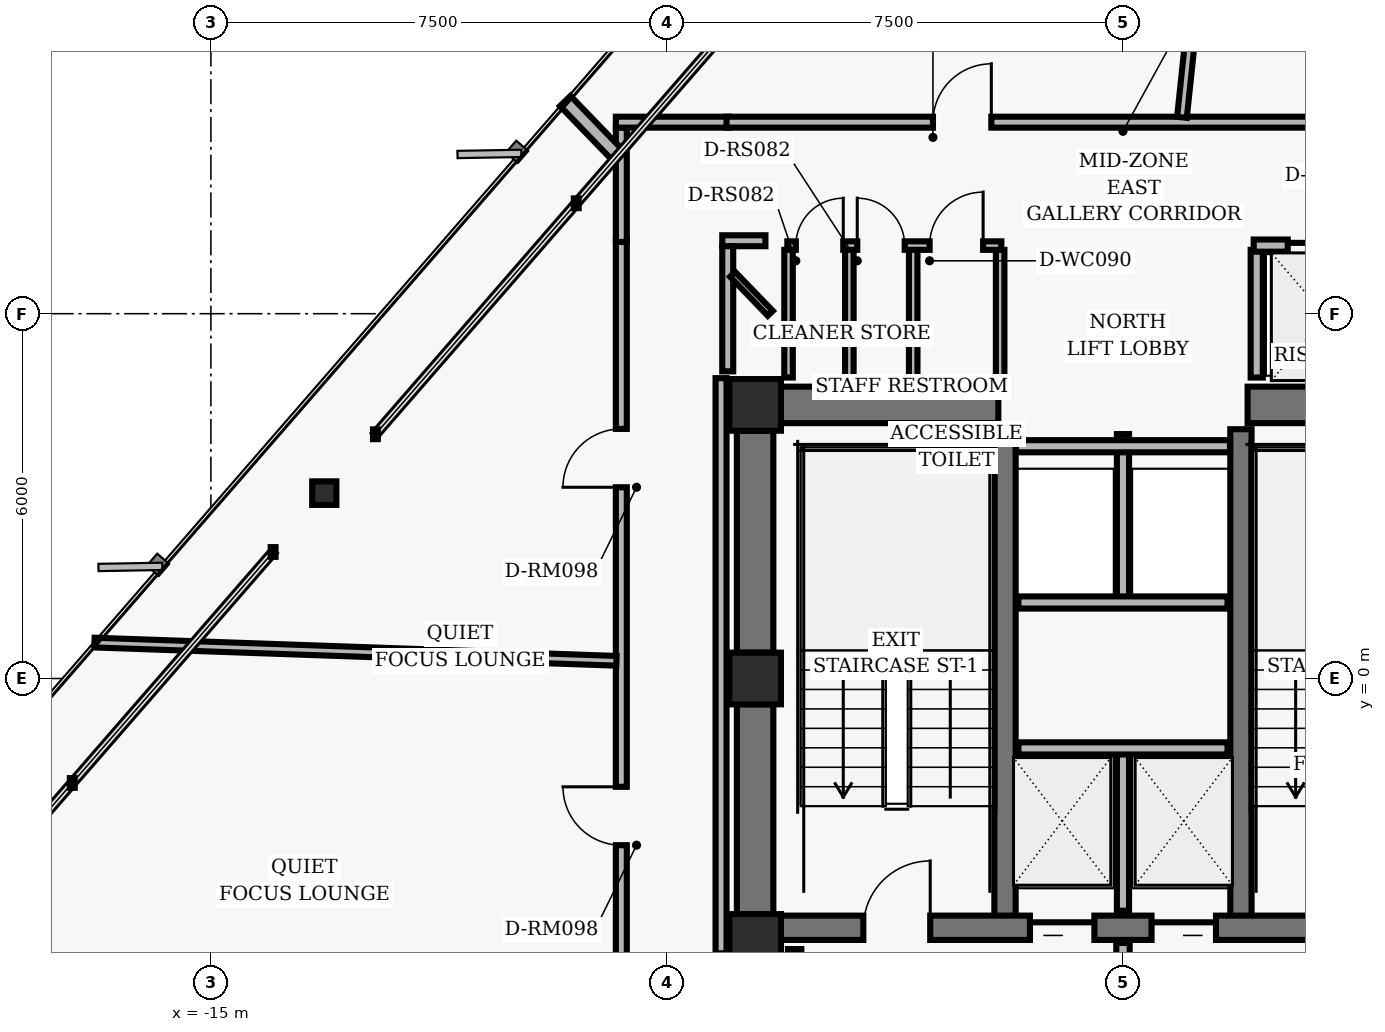
"""IFC4 building model, lengths in metres.
Left out: names, types, materials, properties, quantities, classifications, styles, units other than length and angle.
Written with IfcOpenShell. Run it as: python <this file> out.ifc"""

import sys

from ifc_helpers import new_model, si_unit, direction, frame, frame_2d, origin, origin_2d, place, context, subcontext, project, spatial, rectangle, hollow_rectangle, i_section, extrude, element, fill, save


model = new_model("IFC4")
c1 = context("Model", 3, precision=1e-05, world=origin(), true_north=direction((0.0, 1.0)))
c2 = subcontext(c1, "Body", "Model", "MODEL_VIEW")
j1 = project(units=[si_unit("LENGTHUNIT", "METRE"), si_unit("PLANEANGLEUNIT", "RADIAN")], contexts=[c1])
p1 = place(None, origin())
s1 = spatial("IfcSite", under=j1, at=p1, CompositionType="ELEMENT")
p2 = place(p1, origin())
s2 = spatial("IfcBuilding", under=s1, at=p2, CompositionType="ELEMENT")
p3 = place(p2, frame((0.0, 0.0, 162.4)))
s3 = spatial("IfcBuildingStorey", under=s2, at=p3, CompositionType="ELEMENT", Elevation=162.4)
for number, where, z_axis, x_axis in (
    (1, (-6.05, 4.5, 0.0), (0.0, 0.0, 1.0), (1.0, 0.0, 0.0)),
    (2, (-6.05, 0.0, 0.0), (0.0, 0.0, 1.0), (1.0, 0.0, 0.0)),
    (3, (-6.05, -4.3, 0.0), (0.0, 0.0, 1.0), (1.0, 0.0, 0.0)),
):
    element("IfcColumn", number, at=place(p3, frame(where, z_axis=z_axis, x_axis=x_axis)), inside=s3, PredefinedType="COLUMN", context=c2, shape_type="SweptSolid", body=[
        extrude(hollow_rectangle(XDim=0.85, YDim=0.85, WallThickness=0.055, InnerFilletRadius=0.02, OuterFilletRadius=0.04, at=origin_2d()), origin(), (0.0, 0.0, 1.0), 3.04),
    ])
p4 = place(p3, frame((-6.05, 0.425, 0.0), z_axis=(0.0, 0.0, 1.0), x_axis=(0.0, 1.0, 0.0)))
e4 = element("IfcWall", 4, at=p4, inside=s3, PredefinedType="SHEAR", context=c2, shape_type="SweptSolid", body=[
    extrude(rectangle(XDim=3.65, YDim=0.6, at=frame_2d((1.825, 0.0))), origin(), (0.0, 0.0, 1.0), 2.788),
])
p5 = place(p3, frame((-6.05, -3.875, 0.0), z_axis=(0.0, 0.0, 1.0), x_axis=(0.0, 1.0, 0.0)))
e5 = element("IfcWall", 5, at=p5, inside=s3, PredefinedType="SHEAR", context=c2, shape_type="SweptSolid", body=[
    extrude(rectangle(XDim=3.45, YDim=0.6, at=frame_2d((1.725, 0.0))), origin(), (0.0, 0.0, 1.0), 2.788),
])
for number, where, z_axis, x_axis in (
    (6, (-1.94, -4.1, 0.0), (0.0, 0.0, 1.0), (0.0, 1.0, 0.0)),
    (7, (1.94, -4.1, 0.0), (0.0, 0.0, 1.0), (0.0, 1.0, 0.0)),
):
    element("IfcWall", number, at=place(p3, frame(where, z_axis=z_axis, x_axis=x_axis)), inside=s3, PredefinedType="SHEAR", context=c2, shape_type="SweptSolid", body=[
        extrude(rectangle(XDim=8.2, YDim=0.35, at=frame_2d((4.1, 0.0))), origin(), (0.0, 0.0, 1.0), 2.788),
    ])
p6 = place(p3, frame((-5.625, -4.1, 0.0), z_axis=(0.0, 0.0, 1.0), x_axis=(1.0, 0.0, 0.0)))
e8 = element("IfcWall", 8, at=p6, inside=s3, PredefinedType="SHEAR", context=c2, shape_type="SweptSolid", body=[
    extrude(rectangle(XDim=11.25, YDim=0.4, at=frame_2d((5.625, 0.0))), origin(), (0.0, 0.0, 1.0), 2.788),
])
p7 = place(p6, frame((1.355, 0.0, 0.0)))
e9 = element("IfcOpeningElement", 9, at=p7, cuts=e8, PredefinedType="OPENING", context=c2, shape_type="SweptSolid", body=[
    extrude(rectangle(XDim=1.1, YDim=2.04, at=frame_2d((0.55, 1.02))), frame((0.0, 0.21, 0.0), z_axis=(0.0, -1.0, 0.0), x_axis=(1.0, 0.0, 0.0)), (0.0, 0.0, 1.0), 0.42),
])
p8 = place(p6, frame((8.795, 0.0, 0.0)))
e10 = element("IfcOpeningElement", 10, at=p8, cuts=e8, PredefinedType="OPENING", context=c2, shape_type="SweptSolid", body=[
    extrude(rectangle(XDim=1.1, YDim=2.04, at=frame_2d((0.55, 1.02))), frame((0.0, 0.21, 0.0), z_axis=(0.0, -1.0, 0.0), x_axis=(1.0, 0.0, 0.0)), (0.0, 0.0, 1.0), 0.42),
])
p9 = place(p6, frame((4.095, 0.0, 0.0)))
e11 = element("IfcOpeningElement", 11, at=p9, cuts=e8, PredefinedType="OPENING", context=c2, shape_type="SweptSolid", body=[
    extrude(rectangle(XDim=1.06, YDim=2.04, at=frame_2d((0.53, 1.02))), frame((0.0, 0.21, 0.0), z_axis=(0.0, -1.0, 0.0), x_axis=(1.0, 0.0, 0.0)), (0.0, 0.0, 1.0), 0.42),
])
p10 = place(p6, frame((6.095, 0.0, 0.0)))
e12 = element("IfcOpeningElement", 12, at=p10, cuts=e8, PredefinedType="OPENING", context=c2, shape_type="SweptSolid", body=[
    extrude(rectangle(XDim=1.06, YDim=2.04, at=frame_2d((0.53, 1.02))), frame((0.0, 0.21, 0.0), z_axis=(0.0, -1.0, 0.0), x_axis=(1.0, 0.0, 0.0)), (0.0, 0.0, 1.0), 0.42),
])
for number, where, z_axis, x_axis in (
    (13, (-5.625, 4.5, 0.0), (0.0, 0.0, 1.0), (1.0, 0.0, 0.0)),
    (14, (2.05, 4.5, 0.0), (0.0, 0.0, 1.0), (1.0, 0.0, 0.0)),
):
    element("IfcWall", number, at=place(p3, frame(where, z_axis=z_axis, x_axis=x_axis)), inside=s3, PredefinedType="SHEAR", context=c2, shape_type="SweptSolid", body=[
        extrude(rectangle(XDim=3.575, YDim=0.6, at=frame_2d((1.788, 0.0))), origin(), (0.0, 0.0, 1.0), 2.788),
    ])
p11 = place(p3, frame((-13.135, 3.049, 0.0), z_axis=(0.0, 0.0, 1.0), x_axis=(1.0, 0.0, 0.0)))
e15 = element("IfcColumn", 15, at=p11, inside=s3, PredefinedType="COLUMN", context=c2, shape_type="SweptSolid", body=[
    extrude(i_section(OverallWidth=0.398, OverallDepth=0.387, WebThickness=0.021, FlangeThickness=0.033, FilletRadius=0.018, at=origin_2d()), origin(), (0.0, 0.0, 1.0), 3.04),
])
p12 = place(p3, frame((0.0, -3.82, 0.0), z_axis=(0.0, 0.0, 1.0), x_axis=(0.0, 1.0, 0.0)))
e16 = element("IfcWall", 16, at=p12, inside=s3, PredefinedType="PARTITIONING", context=c2, shape_type="SweptSolid", body=[
    extrude(rectangle(XDim=2.67, YDim=0.2, at=frame_2d((1.335, 0.0))), origin(), (0.0, 0.0, 1.0), 2.763),
])
p13 = place(p3, frame((-1.72, -1.15, 0.0), z_axis=(0.0, 0.0, 1.0), x_axis=(1.0, 0.0, 0.0)))
e17 = element("IfcWall", 17, at=p13, inside=s3, PredefinedType="PARTITIONING", context=c2, shape_type="SweptSolid", body=[
    extrude(rectangle(XDim=3.44, YDim=0.2, at=frame_2d((1.72, 0.0))), origin(), (0.0, 0.0, 1.0), 2.763),
])
p14 = place(p3, frame((-5.4, -7.16, 0.0), z_axis=(0.0, 0.0, 1.0), x_axis=(0.0, 1.0, 0.0)))
e18 = element("IfcWall", 18, at=p14, inside=s3, PredefinedType="PARTITIONING", context=c2, shape_type="SweptSolid", body=[
    extrude(rectangle(XDim=2.71, YDim=0.22, at=frame_2d((1.355, 0.0))), origin(), (0.0, 0.0, 1.0), 2.763),
])
p15 = place(p3, frame((0.0, -7.16, 0.0), z_axis=(0.0, 0.0, 1.0), x_axis=(0.0, 1.0, 0.0)))
e19 = element("IfcWall", 19, at=p15, inside=s3, PredefinedType="PARTITIONING", context=c2, shape_type="SweptSolid", body=[
    extrude(rectangle(XDim=2.81, YDim=0.22, at=frame_2d((1.405, 0.0))), origin(), (0.0, 0.0, 1.0), 2.763),
])
p16 = place(p3, frame((0.0, 1.25, 0.0), z_axis=(0.0, 0.0, 1.0), x_axis=(0.0, 1.0, 0.0)))
e20 = element("IfcWall", 20, at=p16, inside=s3, PredefinedType="PARTITIONING", context=c2, shape_type="SweptSolid", body=[
    extrude(rectangle(XDim=2.77, YDim=0.2, at=frame_2d((1.385, 0.0))), origin(), (0.0, 0.0, 1.0), 2.763),
])
p17 = place(p3, frame((-1.72, 1.25, 0.0), z_axis=(0.0, 0.0, 1.0), x_axis=(1.0, 0.0, 0.0)))
e21 = element("IfcWall", 21, at=p17, inside=s3, PredefinedType="PARTITIONING", context=c2, shape_type="SweptSolid", body=[
    extrude(rectangle(XDim=3.44, YDim=0.2, at=frame_2d((1.72, 0.0))), origin(), (0.0, 0.0, 1.0), 2.763),
])
p18 = place(p3, frame((-1.76, 3.82, 0.0), z_axis=(0.0, 0.0, 1.0), x_axis=(1.0, 0.0, 0.0)))
e22 = element("IfcWall", 22, at=p18, inside=s3, PredefinedType="PARTITIONING", context=c2, shape_type="SweptSolid", body=[
    extrude(rectangle(XDim=3.52, YDim=0.2, at=frame_2d((1.76, 0.0))), origin(), (0.0, 0.0, 1.0), 2.763),
])
p19 = place(p3, frame((2.2, 4.95, 0.0), z_axis=(0.0, 0.0, 1.0), x_axis=(0.0, 1.0, 0.0)))
e23 = element("IfcWall", 23, at=p19, inside=s3, PredefinedType="PARTITIONING", context=c2, shape_type="SweptSolid", body=[
    extrude(rectangle(XDim=2.1, YDim=0.2, at=frame_2d((1.05, 0.0))), origin(), (0.0, 0.0, 1.0), 2.763),
])
p20 = place(p3, frame((2.15, 7.12, 0.0), z_axis=(0.0, 0.0, 1.0), x_axis=(1.0, 0.0, 0.0)))
e24 = element("IfcWall", 24, at=p20, inside=s3, PredefinedType="PARTITIONING", context=c2, shape_type="SweptSolid", body=[
    extrude(rectangle(XDim=2.38, YDim=0.2, at=frame_2d((1.19, 0.0))), origin(), (0.0, 0.0, 1.0), 2.763),
])
p21 = place(p20, frame((0.56, 0.0, 0.0)))
e25 = element("IfcOpeningElement", 25, at=p21, cuts=e24, PredefinedType="OPENING", context=c2, shape_type="SweptSolid", body=[
    extrude(rectangle(XDim=1.26, YDim=2.06, at=frame_2d((0.63, 1.03))), frame((0.0, 0.11, 0.0), z_axis=(0.0, -1.0, 0.0), x_axis=(1.0, 0.0, 0.0)), (0.0, 0.0, 1.0), 0.22),
])
for number, where, z_axis, x_axis in (
    (26, (-5.5, 4.95, 0.0), (0.0, 0.0, 1.0), (0.0, 1.0, 0.0)),
    (27, (-4.5, 4.95, 0.0), (0.0, 0.0, 1.0), (0.0, 1.0, 0.0)),
    (28, (-3.45, 4.95, 0.0), (0.0, 0.0, 1.0), (0.0, 1.0, 0.0)),
    (29, (-2.02, 4.95, 0.0), (0.0, 0.0, 1.0), (0.0, 1.0, 0.0)),
):
    element("IfcWall", number, at=place(p3, frame(where, z_axis=z_axis, x_axis=x_axis)), inside=s3, PredefinedType="PARTITIONING", context=c2, shape_type="SweptSolid", body=[
        extrude(rectangle(XDim=2.1, YDim=0.14, at=frame_2d((1.05, 0.0))), origin(), (0.0, 0.0, 1.0), 2.763),
    ])
p22 = place(p3, frame((-5.52, 7.12, 0.0), z_axis=(0.0, 0.0, 1.0), x_axis=(1.0, 0.0, 0.0)))
e30 = element("IfcWall", 30, at=p22, inside=s3, PredefinedType="PARTITIONING", context=c2, shape_type="SweptSolid", body=[
    extrude(rectangle(XDim=3.52, YDim=0.14, at=frame_2d((1.76, 0.0))), origin(), (0.0, 0.0, 1.0), 2.763),
])
p23 = place(p22, frame((0.14, 0.0, 0.0)))
e31 = element("IfcOpeningElement", 31, at=p23, cuts=e30, PredefinedType="OPENING", context=c2, shape_type="SweptSolid", body=[
    extrude(rectangle(XDim=0.78, YDim=2.01, at=frame_2d((0.39, 1.005))), frame((0.0, 0.08, 0.0), z_axis=(0.0, -1.0, 0.0), x_axis=(1.0, 0.0, 0.0)), (0.0, 0.0, 1.0), 0.16),
])
p24 = place(p22, frame((1.15, 0.0, 0.0)))
e32 = element("IfcOpeningElement", 32, at=p24, cuts=e30, PredefinedType="OPENING", context=c2, shape_type="SweptSolid", body=[
    extrude(rectangle(XDim=0.78, YDim=2.01, at=frame_2d((0.39, 1.005))), frame((0.0, 0.08, 0.0), z_axis=(0.0, -1.0, 0.0), x_axis=(1.0, 0.0, 0.0)), (0.0, 0.0, 1.0), 0.16),
])
p25 = place(p22, frame((2.34, 0.0, 0.0)))
e33 = element("IfcOpeningElement", 33, at=p25, cuts=e30, PredefinedType="OPENING", context=c2, shape_type="SweptSolid", body=[
    extrude(rectangle(XDim=0.88, YDim=2.02, at=frame_2d((0.44, 1.01))), frame((0.0, 0.08, 0.0), z_axis=(0.0, -1.0, 0.0), x_axis=(1.0, 0.0, 0.0)), (0.0, 0.0, 1.0), 0.16),
])
p26 = place(p3, frame((-8.25, -7.22, 0.0), z_axis=(0.0, 0.0, 1.0), x_axis=(0.0, 1.0, 0.0)))
e34 = element("IfcWall", 34, at=p26, inside=s3, PredefinedType="PARTITIONING", context=c2, shape_type="SweptSolid", body=[
    extrude(rectangle(XDim=14.44, YDim=0.18, at=frame_2d((7.22, 0.0))), origin(), (0.0, 0.0, 1.0), 2.763),
])
p27 = place(p26, frame((4.478, 0.0, 0.0)))
e35 = element("IfcOpeningElement", 35, at=p27, cuts=e34, PredefinedType="OPENING", context=c2, shape_type="SweptSolid", body=[
    extrude(rectangle(XDim=0.96, YDim=2.02, at=frame_2d((0.48, 1.01))), frame((0.0, 0.1, 0.0), z_axis=(0.0, -1.0, 0.0), x_axis=(1.0, 0.0, 0.0)), (0.0, 0.0, 1.0), 0.2),
])
p28 = place(p26, frame((10.365, 0.0, 0.0)))
e36 = element("IfcOpeningElement", 36, at=p28, cuts=e34, PredefinedType="OPENING", context=c2, shape_type="SweptSolid", body=[
    extrude(rectangle(XDim=0.96, YDim=2.02, at=frame_2d((0.48, 1.01))), frame((0.0, 0.1, 0.0), z_axis=(0.0, -1.0, 0.0), x_axis=(1.0, 0.0, 0.0)), (0.0, 0.0, 1.0), 0.2),
])
p29 = place(p3, frame((-8.25, 7.18, 0.0), z_axis=(0.0, 0.0, 1.0), x_axis=(0.0, 1.0, 0.0)))
e37 = element("IfcWall", 37, at=p29, inside=s3, PredefinedType="PARTITIONING", context=c2, shape_type="SweptSolid", body=[
    extrude(rectangle(XDim=1.88, YDim=0.18, at=frame_2d((0.94, 0.0))), origin(), (0.0, 0.0, 1.0), 2.763),
])
p30 = place(p3, frame((-8.34, 9.15, 0.0), z_axis=(0.0, 0.0, 1.0), x_axis=(1.0, 0.0, 0.0)))
e38 = element("IfcWall", 38, at=p30, inside=s3, PredefinedType="PARTITIONING", context=c2, shape_type="SweptSolid", body=[
    extrude(rectangle(XDim=1.86, YDim=0.18, at=frame_2d((0.93, 0.0))), origin(), (0.0, 0.0, 1.0), 2.763),
])
p31 = place(p3, frame((-6.52, 9.15, 0.0), z_axis=(0.0, 0.0, 1.0), x_axis=(1.0, 0.0, 0.0)))
e39 = element("IfcWall", 39, at=p31, inside=s3, PredefinedType="PARTITIONING", context=c2, shape_type="SweptSolid", body=[
    extrude(rectangle(XDim=16.662, YDim=0.18, at=frame_2d((8.331, 0.0))), origin(), (0.0, 0.0, 1.0), 2.763),
])
p32 = place(p31, frame((11.466, 0.0, 0.0)))
e40 = element("IfcOpeningElement", 40, at=p32, cuts=e39, PredefinedType="OPENING", context=c2, shape_type="SweptSolid", body=[
    extrude(rectangle(XDim=0.96, YDim=2.02, at=frame_2d((0.48, 1.01))), frame((0.0, 0.1, 0.0), z_axis=(0.0, -1.0, 0.0), x_axis=(1.0, 0.0, 0.0)), (0.0, 0.0, 1.0), 0.2),
])
p33 = place(p31, frame((3.395, 0.0, 0.0)))
e41 = element("IfcOpeningElement", 41, at=p33, cuts=e39, PredefinedType="OPENING", context=c2, shape_type="SweptSolid", body=[
    extrude(rectangle(XDim=0.96, YDim=2.02, at=frame_2d((0.48, 1.01))), frame((0.0, 0.1, 0.0), z_axis=(0.0, -1.0, 0.0), x_axis=(1.0, 0.0, 0.0)), (0.0, 0.0, 1.0), 0.2),
])
p34 = place(p3, frame((-5.88, 7.2, 0.0), z_axis=(0.0, 0.0, 1.0), x_axis=(-1.0, 0.0, 0.0)))
e42 = element("IfcWall", 42, at=p34, inside=s3, PredefinedType="PARTITIONING", context=c2, shape_type="SweptSolid", body=[
    extrude(rectangle(XDim=0.71, YDim=0.18, at=frame_2d((0.355, 0.0))), origin(), (0.0, 0.0, 1.0), 2.763),
])
p35 = place(p3, frame((-6.5, 7.11, 0.0), z_axis=(0.0, 0.0, 1.0), x_axis=(0.0, -1.0, 0.0)))
e43 = element("IfcWall", 43, at=p35, inside=s3, PredefinedType="PARTITIONING", context=c2, shape_type="SweptSolid", body=[
    extrude(rectangle(XDim=2.058, YDim=0.18, at=frame_2d((1.029, 0.0))), origin(), (0.0, 0.0, 1.0), 2.763),
])
p36 = place(p3, frame((-6.61, 4.94, 0.0), z_axis=(0.0, 0.0, 1.0), x_axis=(0.0, -1.0, 0.0)))
e44 = element("IfcWall", 44, at=p36, inside=s3, PredefinedType="PARTITIONING", context=c2, shape_type="SweptSolid", body=[
    extrude(rectangle(XDim=9.46, YDim=0.18, at=frame_2d((4.73, 0.0))), origin(), (0.0, 0.0, 1.0), 2.763),
])
p37 = place(p3, frame((0.97, 9.23, 0.0), z_axis=(0.0, 0.0, 1.0), x_axis=(0.10452931889, 0.994521805438, 0.0)))
e45 = element("IfcWall", 45, at=p37, inside=s3, PredefinedType="PARTITIONING", context=c2, shape_type="SweptSolid", body=[
    extrude(rectangle(XDim=13.652, YDim=0.16, at=frame_2d((6.826, 0.0))), origin(), (0.0, 0.0, 1.0), 2.763),
])
p38 = place(p3, frame((-5.8, 6.006, 0.0), z_axis=(0.0, 0.0, 1.0), x_axis=(-0.694550575615, 0.719443881003, 0.0)))
e46 = element("IfcWall", 46, at=p38, inside=s3, PredefinedType="MOVABLE", context=c2, shape_type="SweptSolid", body=[
    extrude(rectangle(XDim=0.893, YDim=0.115, at=frame_2d((0.446, 0.0))), origin(), (0.0, 0.0, 1.0), 2.763),
])
p39 = place(p3, frame((-8.33, 8.626, 0.0), z_axis=(0.0, 0.0, 1.0), x_axis=(-0.694612484143, 0.719384109411, 0.0)))
e47 = element("IfcWall", 47, at=p39, inside=s3, PredefinedType="PARTITIONING", context=c2, shape_type="SweptSolid", body=[
    extrude(rectangle(XDim=1.212, YDim=0.24, at=frame_2d((0.606, 0.0))), origin(), (0.0, 0.0, 1.0), 2.763),
])
p40 = place(p3, frame((-8.33, 0.291, 0.0), z_axis=(0.0, 0.0, 1.0), x_axis=(-0.999390815976, 0.03489981294, 0.0)))
e48 = element("IfcWall", 48, at=p40, inside=s3, PredefinedType="PARTITIONING", context=c2, shape_type="SweptSolid", body=[
    extrude(rectangle(XDim=8.59, YDim=0.16, at=frame_2d((4.295, 0.0))), origin(), (0.0, 0.0, 1.0), 2.763),
])
p41 = place(p7, origin())
e49 = element("IfcDoor", 49, at=p41, inside=s3, OperationType="SINGLE_SWING_RIGHT", PredefinedType="DOOR", context=c2, shape_type="SweptSolid", body=[
    extrude(rectangle(XDim=1.1, YDim=2.04, at=frame_2d((0.55, 1.02))), frame((0.0, 0.025, 0.0), z_axis=(0.0, -1.0, 0.0), x_axis=(1.0, 0.0, 0.0)), (0.0, 0.0, 1.0), 0.05),
])
fill(e9, e49)
p42 = place(p9, origin())
e50 = element("IfcDoor", 50, at=p42, inside=s3, OperationType="SLIDING_TO_LEFT", PredefinedType="DOOR", context=c2, shape_type="SweptSolid", body=[
    extrude(rectangle(XDim=1.06, YDim=2.04, at=frame_2d((0.53, 1.02))), frame((0.0, 0.025, 0.0), z_axis=(0.0, -1.0, 0.0), x_axis=(1.0, 0.0, 0.0)), (0.0, 0.0, 1.0), 0.05),
])
fill(e11, e50)
p43 = place(p10, origin())
e51 = element("IfcDoor", 51, at=p43, inside=s3, OperationType="SLIDING_TO_RIGHT", PredefinedType="DOOR", context=c2, shape_type="SweptSolid", body=[
    extrude(rectangle(XDim=1.06, YDim=2.04, at=frame_2d((0.53, 1.02))), frame((0.0, 0.025, 0.0), z_axis=(0.0, -1.0, 0.0), x_axis=(1.0, 0.0, 0.0)), (0.0, 0.0, 1.0), 0.05),
])
fill(e12, e51)
p44 = place(p21, origin())
e52 = element("IfcDoor", 52, at=p44, inside=s3, OperationType="SLIDING_TO_LEFT", PredefinedType="DOOR", context=c2, shape_type="SweptSolid", body=[
    extrude(rectangle(XDim=1.26, YDim=2.06, at=frame_2d((0.63, 1.03))), frame((0.0, 0.025, 0.0), z_axis=(0.0, -1.0, 0.0), x_axis=(1.0, 0.0, 0.0)), (0.0, 0.0, 1.0), 0.05),
])
fill(e25, e52)
p45 = place(p23, origin())
e53 = element("IfcDoor", 53, at=p45, inside=s3, OperationType="SINGLE_SWING_RIGHT", PredefinedType="DOOR", context=c2, shape_type="SweptSolid", body=[
    extrude(rectangle(XDim=0.78, YDim=2.01, at=frame_2d((0.39, 1.005))), frame((0.0, 0.025, 0.0), z_axis=(0.0, -1.0, 0.0), x_axis=(1.0, 0.0, 0.0)), (0.0, 0.0, 1.0), 0.05),
])
fill(e31, e53)
p46 = place(p24, origin())
e54 = element("IfcDoor", 54, at=p46, inside=s3, OperationType="SINGLE_SWING_LEFT", PredefinedType="DOOR", context=c2, shape_type="SweptSolid", body=[
    extrude(rectangle(XDim=0.78, YDim=2.01, at=frame_2d((0.39, 1.005))), frame((0.0, 0.025, 0.0), z_axis=(0.0, -1.0, 0.0), x_axis=(1.0, 0.0, 0.0)), (0.0, 0.0, 1.0), 0.05),
])
fill(e32, e54)
p47 = place(p25, origin())
e55 = element("IfcDoor", 55, at=p47, inside=s3, OperationType="SINGLE_SWING_RIGHT", PredefinedType="DOOR", context=c2, shape_type="SweptSolid", body=[
    extrude(rectangle(XDim=0.88, YDim=2.02, at=frame_2d((0.44, 1.01))), frame((0.0, 0.025, 0.0), z_axis=(0.0, -1.0, 0.0), x_axis=(1.0, 0.0, 0.0)), (0.0, 0.0, 1.0), 0.05),
])
fill(e33, e55)
p48 = place(p27, origin())
e56 = element("IfcDoor", 56, at=p48, inside=s3, OperationType="SINGLE_SWING_RIGHT", PredefinedType="DOOR", context=c2, shape_type="SweptSolid", body=[
    extrude(rectangle(XDim=0.96, YDim=2.02, at=frame_2d((0.48, 1.01))), frame((0.0, 0.025, 0.0), z_axis=(0.0, -1.0, 0.0), x_axis=(1.0, 0.0, 0.0)), (0.0, 0.0, 1.0), 0.05),
])
fill(e35, e56)
p49 = place(p33, origin())
e57 = element("IfcDoor", 57, at=p49, inside=s3, OperationType="SINGLE_SWING_RIGHT", PredefinedType="DOOR", context=c2, shape_type="SweptSolid", body=[
    extrude(rectangle(XDim=0.96, YDim=2.02, at=frame_2d((0.48, 1.01))), frame((0.0, 0.025, 0.0), z_axis=(0.0, -1.0, 0.0), x_axis=(1.0, 0.0, 0.0)), (0.0, 0.0, 1.0), 0.05),
])
fill(e41, e57)
p50 = place(p28, origin())
e58 = element("IfcDoor", 58, at=p50, inside=s3, OperationType="SINGLE_SWING_LEFT", PredefinedType="DOOR", context=c2, shape_type="SweptSolid", body=[
    extrude(rectangle(XDim=0.96, YDim=2.02, at=frame_2d((0.48, 1.01))), frame((0.0, 0.025, 0.0), z_axis=(0.0, -1.0, 0.0), x_axis=(1.0, 0.0, 0.0)), (0.0, 0.0, 1.0), 0.05),
])
fill(e36, e58)
save(model, sys.argv[1])
